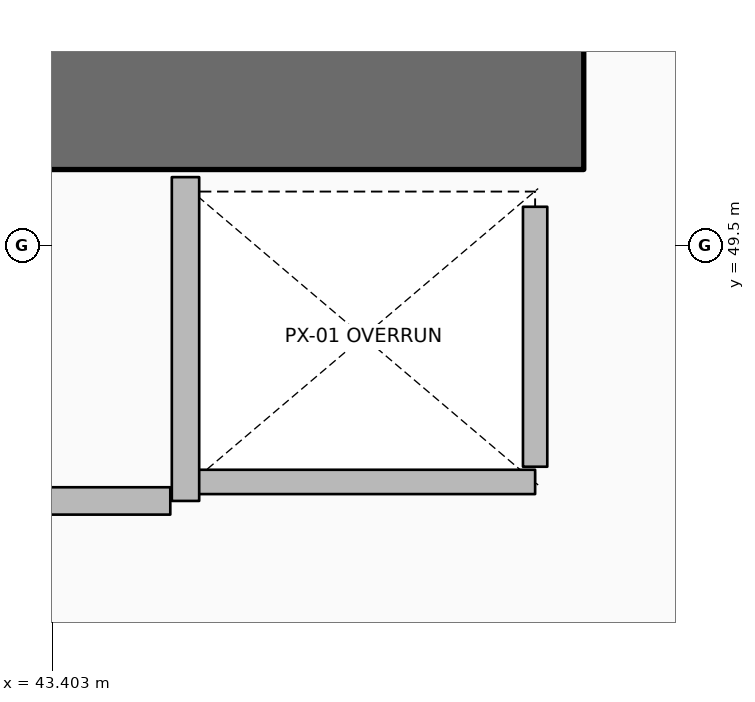
"""IFC4 building model, lengths in metres.
Left out: names, types, materials, properties, quantities, classifications, styles, units other than length and angle.
Written with IfcOpenShell. Run it as: python <this file> out.ifc"""

import sys

from ifc_helpers import new_model, si_unit, direction, frame, frame_2d, origin, place, context, subcontext, project, spatial, rectangle, extrude, element, save


model = new_model("IFC4")
c1 = context("Model", 3, precision=1e-05, world=origin(), true_north=direction((0.0, 1.0)))
c2 = subcontext(c1, "Body", "Model", "MODEL_VIEW")
j1 = project(units=[si_unit("LENGTHUNIT", "METRE"), si_unit("PLANEANGLEUNIT", "RADIAN")], contexts=[c1])
p1 = place(None, origin())
s1 = spatial("IfcSite", under=j1, at=p1, CompositionType="ELEMENT")
p2 = place(p1, origin())
s2 = spatial("IfcBuilding", under=s1, at=p2, CompositionType="ELEMENT")
p3 = place(p2, frame((0.0, 0.0, 116.4)))
s3 = spatial("IfcBuildingStorey", under=s2, at=p3, CompositionType="ELEMENT", Elevation=116.4)
p4 = place(p3, frame((37.0, 50.4, 0.0), z_axis=(0.0, 0.0, 1.0), x_axis=(1.0, 0.0, 0.0)))
e1 = element("IfcWall", 1, at=p4, inside=s3, PredefinedType="SHEAR", context=c2, shape_type="SweptSolid", body=[
    extrude(rectangle(XDim=9.9, YDim=0.8, at=frame_2d((4.95, 0.0))), origin(), (0.0, 0.0, 1.0), 6.6),
])
p5 = place(p3, frame((46.58, 47.945, 0.0), z_axis=(0.0, 0.0, 1.0), x_axis=(-1.0, 0.0, 0.0)))
e2 = element("IfcWall", 2, at=p5, inside=s3, PredefinedType="PARTITIONING", context=c2, shape_type="SweptSolid", body=[
    extrude(rectangle(XDim=2.26, YDim=0.16, at=frame_2d((1.13, 0.0))), origin(), (0.0, 0.0, 1.0), 6.28),
])
p6 = place(p3, frame((46.58, 48.045, 0.0), z_axis=(0.0, 0.0, 1.0), x_axis=(0.0, 1.0, 0.0)))
e3 = element("IfcWall", 3, at=p6, inside=s3, PredefinedType="PARTITIONING", context=c2, shape_type="SweptSolid", body=[
    extrude(rectangle(XDim=1.71, YDim=0.16, at=frame_2d((0.855, 0.0))), origin(), (0.0, 0.0, 1.0), 6.28),
])
p7 = place(p3, frame((37.92, 47.82, 0.0), z_axis=(0.0, 0.0, 1.0), x_axis=(1.0, 0.0, 0.0)))
e4 = element("IfcWall", 4, at=p7, inside=s3, PredefinedType="PARTITIONING", context=c2, shape_type="SweptSolid", body=[
    extrude(rectangle(XDim=6.26, YDim=0.18, at=frame_2d((3.13, 0.0))), origin(), (0.0, 0.0, 1.0), 6.28),
])
p8 = place(p7, frame((2.705, 0.0, 0.0)))
e5 = element("IfcOpeningElement", 5, at=p8, cuts=e4, PredefinedType="OPENING", context=c2, shape_type="SweptSolid", body=[
    extrude(rectangle(XDim=0.85, YDim=2.06, at=frame_2d((0.425, 1.03))), frame((0.0, 0.1, 0.0), z_axis=(0.0, -1.0, 0.0), x_axis=(1.0, 0.0, 0.0)), (0.0, 0.0, 1.0), 0.2),
])
p9 = place(p3, frame((44.28, 47.82, 0.0), z_axis=(0.0, 0.0, 1.0), x_axis=(0.0, 1.0, 0.0)))
e6 = element("IfcWall", 6, at=p9, inside=s3, PredefinedType="PARTITIONING", context=c2, shape_type="SweptSolid", body=[
    extrude(rectangle(XDim=2.13, YDim=0.18, at=frame_2d((1.065, 0.0))), origin(), (0.0, 0.0, 1.0), 6.28),
])
save(model, sys.argv[1])
